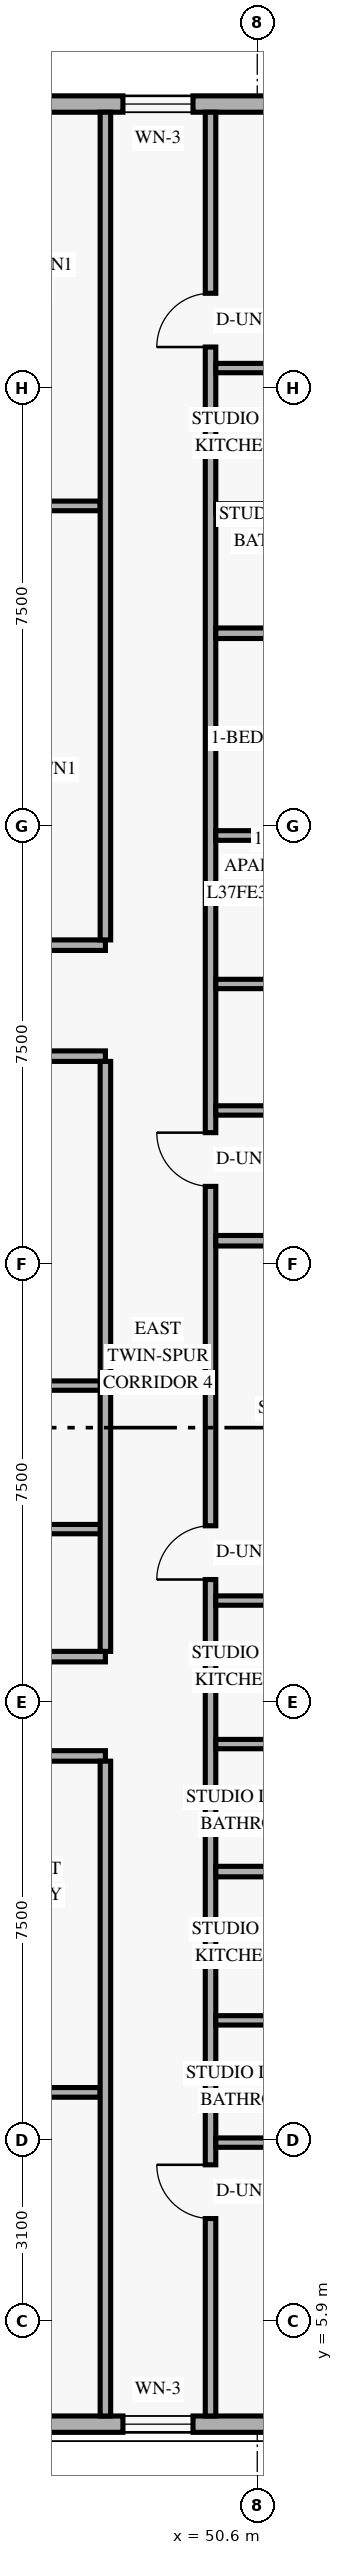
"""IFC4 building model, lengths in metres.
Left out: names, types, materials, properties, quantities, classifications, styles, units other than length and angle.
Written with IfcOpenShell. Run it as: python <this file> out.ifc"""

import sys

from ifc_helpers import new_model, si_unit, direction, frame, frame_2d, origin, place, context, subcontext, project, spatial, rectangle, extrude, element, fill, save


model = new_model("IFC4")
c1 = context("Model", 3, precision=1e-05, world=origin(), true_north=direction((0.0, 1.0)))
c2 = subcontext(c1, "Body", "Model", "MODEL_VIEW")
j1 = project(units=[si_unit("LENGTHUNIT", "METRE"), si_unit("PLANEANGLEUNIT", "RADIAN")], contexts=[c1])
p1 = place(None, origin())
s1 = spatial("IfcSite", under=j1, at=p1, CompositionType="ELEMENT")
p2 = place(p1, origin())
s2 = spatial("IfcBuilding", under=s1, at=p2, CompositionType="ELEMENT")
p3 = place(p2, frame((0.0, 0.0, 144.6)))
s3 = spatial("IfcBuildingStorey", under=s2, at=p3, CompositionType="ELEMENT", Elevation=144.6)
p4 = place(p3, frame((21.22, 4.14, 0.0), z_axis=(0.0, 0.0, 1.0), x_axis=(1.0, 0.0, 0.0)))
e1 = element("IfcWall", 1, at=p4, inside=s3, PredefinedType="SOLIDWALL", context=c2, shape_type="SweptSolid", body=[
    extrude(rectangle(XDim=33.76, YDim=0.28, at=frame_2d((16.88, 0.0))), origin(), (0.0, 0.0, 1.0), 3.36),
])
p5 = place(p4, frame((2.83, 0.0, 0.85)))
e2 = element("IfcOpeningElement", 2, at=p5, cuts=e1, PredefinedType="OPENING", context=c2, shape_type="SweptSolid", body=[
    extrude(rectangle(XDim=1.35, YDim=1.55, at=frame_2d((0.675, 0.775))), frame((0.0, 0.15, 0.0), z_axis=(0.0, -1.0, 0.0), x_axis=(1.0, 0.0, 0.0)), (0.0, 0.0, 1.0), 0.3),
])
p6 = place(p4, frame((9.715, 0.0, 0.85)))
e3 = element("IfcOpeningElement", 3, at=p6, cuts=e1, PredefinedType="OPENING", context=c2, shape_type="SweptSolid", body=[
    extrude(rectangle(XDim=1.35, YDim=1.55, at=frame_2d((0.675, 0.775))), frame((0.0, 0.15, 0.0), z_axis=(0.0, -1.0, 0.0), x_axis=(1.0, 0.0, 0.0)), (0.0, 0.0, 1.0), 0.3),
])
p7 = place(p4, frame((14.99, 0.0, 0.85)))
e4 = element("IfcOpeningElement", 4, at=p7, cuts=e1, PredefinedType="OPENING", context=c2, shape_type="SweptSolid", body=[
    extrude(rectangle(XDim=1.35, YDim=1.55, at=frame_2d((0.675, 0.775))), frame((0.0, 0.15, 0.0), z_axis=(0.0, -1.0, 0.0), x_axis=(1.0, 0.0, 0.0)), (0.0, 0.0, 1.0), 0.3),
])
p8 = place(p4, frame((19.55, 0.0, 0.85)))
e5 = element("IfcOpeningElement", 5, at=p8, cuts=e1, PredefinedType="OPENING", context=c2, shape_type="SweptSolid", body=[
    extrude(rectangle(XDim=1.35, YDim=1.55, at=frame_2d((0.675, 0.775))), frame((0.0, 0.15, 0.0), z_axis=(0.0, -1.0, 0.0), x_axis=(1.0, 0.0, 0.0)), (0.0, 0.0, 1.0), 0.3),
])
p9 = place(p4, frame((24.375, 0.0, 0.85)))
e6 = element("IfcOpeningElement", 6, at=p9, cuts=e1, PredefinedType="OPENING", context=c2, shape_type="SweptSolid", body=[
    extrude(rectangle(XDim=1.35, YDim=1.55, at=frame_2d((0.675, 0.775))), frame((0.0, 0.15, 0.0), z_axis=(0.0, -1.0, 0.0), x_axis=(1.0, 0.0, 0.0)), (0.0, 0.0, 1.0), 0.3),
])
p10 = place(p4, frame((27.08, 0.0, 0.85)))
e7 = element("IfcOpeningElement", 7, at=p10, cuts=e1, PredefinedType="OPENING", context=c2, shape_type="SweptSolid", body=[
    extrude(rectangle(XDim=1.2, YDim=1.5, at=frame_2d((0.6, 0.75))), frame((0.0, 0.15, 0.0), z_axis=(0.0, -1.0, 0.0), x_axis=(1.0, 0.0, 0.0)), (0.0, 0.0, 1.0), 0.3),
])
p11 = place(p4, frame((30.495, 0.0, 0.85)))
e8 = element("IfcOpeningElement", 8, at=p11, cuts=e1, PredefinedType="OPENING", context=c2, shape_type="SweptSolid", body=[
    extrude(rectangle(XDim=1.35, YDim=1.55, at=frame_2d((0.675, 0.775))), frame((0.0, 0.15, 0.0), z_axis=(0.0, -1.0, 0.0), x_axis=(1.0, 0.0, 0.0)), (0.0, 0.0, 1.0), 0.3),
])
p12 = place(p3, frame((54.98, 43.86, 0.0), z_axis=(0.0, 0.0, 1.0), x_axis=(-1.0, 0.0, 0.0)))
e9 = element("IfcWall", 9, at=p12, inside=s3, PredefinedType="SOLIDWALL", context=c2, shape_type="SweptSolid", body=[
    extrude(rectangle(XDim=33.76, YDim=0.28, at=frame_2d((16.88, 0.0))), origin(), (0.0, 0.0, 1.0), 3.36),
])
p13 = place(p12, frame((28.28, 0.0, 0.85)))
e10 = element("IfcOpeningElement", 10, at=p13, cuts=e9, PredefinedType="OPENING", context=c2, shape_type="SweptSolid", body=[
    extrude(rectangle(XDim=1.35, YDim=1.55, at=frame_2d((0.675, 0.775))), frame((0.0, 0.15, 0.0), z_axis=(0.0, -1.0, 0.0), x_axis=(1.0, 0.0, 0.0)), (0.0, 0.0, 1.0), 0.3),
])
p14 = place(p12, frame((21.395, 0.0, 0.85)))
e11 = element("IfcOpeningElement", 11, at=p14, cuts=e9, PredefinedType="OPENING", context=c2, shape_type="SweptSolid", body=[
    extrude(rectangle(XDim=1.35, YDim=1.55, at=frame_2d((0.675, 0.775))), frame((0.0, 0.15, 0.0), z_axis=(0.0, -1.0, 0.0), x_axis=(1.0, 0.0, 0.0)), (0.0, 0.0, 1.0), 0.3),
])
p15 = place(p12, frame((15.09, 0.0, 0.85)))
e12 = element("IfcOpeningElement", 12, at=p15, cuts=e9, PredefinedType="OPENING", context=c2, shape_type="SweptSolid", body=[
    extrude(rectangle(XDim=1.35, YDim=1.55, at=frame_2d((0.675, 0.775))), frame((0.0, 0.15, 0.0), z_axis=(0.0, -1.0, 0.0), x_axis=(1.0, 0.0, 0.0)), (0.0, 0.0, 1.0), 0.3),
])
p16 = place(p12, frame((8.8, 0.0, 0.85)))
e13 = element("IfcOpeningElement", 13, at=p16, cuts=e9, PredefinedType="OPENING", context=c2, shape_type="SweptSolid", body=[
    extrude(rectangle(XDim=1.35, YDim=1.55, at=frame_2d((0.675, 0.775))), frame((0.0, 0.15, 0.0), z_axis=(0.0, -1.0, 0.0), x_axis=(1.0, 0.0, 0.0)), (0.0, 0.0, 1.0), 0.3),
])
p17 = place(p12, frame((5.48, 0.0, 0.85)))
e14 = element("IfcOpeningElement", 14, at=p17, cuts=e9, PredefinedType="OPENING", context=c2, shape_type="SweptSolid", body=[
    extrude(rectangle(XDim=1.2, YDim=1.5, at=frame_2d((0.6, 0.75))), frame((0.0, 0.15, 0.0), z_axis=(0.0, -1.0, 0.0), x_axis=(1.0, 0.0, 0.0)), (0.0, 0.0, 1.0), 0.3),
])
p18 = place(p12, frame((1.915, 0.0, 0.85)))
e15 = element("IfcOpeningElement", 15, at=p18, cuts=e9, PredefinedType="OPENING", context=c2, shape_type="SweptSolid", body=[
    extrude(rectangle(XDim=1.35, YDim=1.55, at=frame_2d((0.675, 0.775))), frame((0.0, 0.15, 0.0), z_axis=(0.0, -1.0, 0.0), x_axis=(1.0, 0.0, 0.0)), (0.0, 0.0, 1.0), 0.3),
])
p19 = place(p3, frame((38.433, 15.58, 0.0), z_axis=(0.0, 0.0, 1.0), x_axis=(1.0, 0.0, 0.0)))
e16 = element("IfcWall", 16, at=p19, inside=s3, PredefinedType="STANDARD", context=c2, shape_type="SweptSolid", body=[
    extrude(rectangle(XDim=9.567, YDim=0.18, at=frame_2d((4.784, 0.0))), origin(), (0.0, 0.0, 1.0), 2.73),
])
p20 = place(p19, frame((0.327, 0.0, 0.0)))
e17 = element("IfcOpeningElement", 17, at=p20, cuts=e16, PredefinedType="OPENING", context=c2, shape_type="SweptSolid", body=[
    extrude(rectangle(XDim=0.92, YDim=2.15, at=frame_2d((0.46, 1.075))), frame((0.0, 0.1, 0.0), z_axis=(0.0, -1.0, 0.0), x_axis=(1.0, 0.0, 0.0)), (0.0, 0.0, 1.0), 0.2),
])
p21 = place(p3, frame((37.64, 17.28, 0.0), z_axis=(0.0, 0.0, 1.0), x_axis=(1.0, 0.0, 0.0)))
e18 = element("IfcWall", 18, at=p21, inside=s3, PredefinedType="STANDARD", context=c2, shape_type="SweptSolid", body=[
    extrude(rectangle(XDim=10.36, YDim=0.18, at=frame_2d((5.18, 0.0))), origin(), (0.0, 0.0, 1.0), 2.73),
])
p22 = place(p21, frame((5.625, 0.0, 0.0)))
e19 = element("IfcOpeningElement", 19, at=p22, cuts=e18, PredefinedType="OPENING", context=c2, shape_type="SweptSolid", body=[
    extrude(rectangle(XDim=0.92, YDim=2.15, at=frame_2d((0.46, 1.075))), frame((0.0, 0.1, 0.0), z_axis=(0.0, -1.0, 0.0), x_axis=(1.0, 0.0, 0.0)), (0.0, 0.0, 1.0), 0.2),
])
p23 = place(p3, frame((37.64, 27.56, 0.0), z_axis=(0.0, 0.0, 1.0), x_axis=(1.0, 0.0, 0.0)))
e20 = element("IfcWall", 20, at=p23, inside=s3, PredefinedType="STANDARD", context=c2, shape_type="SweptSolid", body=[
    extrude(rectangle(XDim=10.36, YDim=0.18, at=frame_2d((5.18, 0.0))), origin(), (0.0, 0.0, 1.0), 2.73),
])
p24 = place(p3, frame((35.51, 29.46, 0.0), z_axis=(0.0, 0.0, 1.0), x_axis=(1.0, 0.0, 0.0)))
e21 = element("IfcWall", 21, at=p24, inside=s3, PredefinedType="STANDARD", context=c2, shape_type="SweptSolid", body=[
    extrude(rectangle(XDim=12.49, YDim=0.18, at=frame_2d((6.245, 0.0))), origin(), (0.0, 0.0, 1.0), 2.73),
])
p25 = place(p24, frame((0.32, 0.0, 0.0)))
e22 = element("IfcOpeningElement", 22, at=p25, cuts=e21, PredefinedType="OPENING", context=c2, shape_type="SweptSolid", body=[
    extrude(rectangle(XDim=0.92, YDim=2.15, at=frame_2d((0.46, 1.075))), frame((0.0, 0.1, 0.0), z_axis=(0.0, -1.0, 0.0), x_axis=(1.0, 0.0, 0.0)), (0.0, 0.0, 1.0), 0.2),
])
p26 = place(p3, frame((44.62, 9.82, 0.0), z_axis=(0.0, 0.0, 1.0), x_axis=(1.0, 0.0, 0.0)))
e23 = element("IfcWall", 23, at=p26, inside=s3, PredefinedType="PARTITIONING", context=c2, shape_type="SweptSolid", body=[
    extrude(rectangle(XDim=3.29, YDim=0.165, at=frame_2d((1.645, 0.0))), origin(), (0.0, 0.0, 1.0), 2.73),
])
p27 = place(p3, frame((43.09, 36.98, 0.0), z_axis=(0.0, 0.0, 1.0), x_axis=(1.0, 0.0, 0.0)))
e24 = element("IfcWall", 24, at=p27, inside=s3, PredefinedType="PARTITIONING", context=c2, shape_type="SweptSolid", body=[
    extrude(rectangle(XDim=4.82, YDim=0.165, at=frame_2d((2.41, 0.0))), origin(), (0.0, 0.0, 1.0), 2.73),
])
p28 = place(p3, frame((45.38, 21.92, 0.0), z_axis=(0.0, 0.0, 1.0), x_axis=(1.0, 0.0, 0.0)))
e25 = element("IfcWall", 25, at=p28, inside=s3, PredefinedType="PLUMBINGWALL", context=c2, shape_type="SweptSolid", body=[
    extrude(rectangle(XDim=2.62, YDim=0.16, at=frame_2d((1.31, 0.0))), origin(), (0.0, 0.0, 1.0), 3.36),
])
p29 = place(p3, frame((45.54, 19.463, 0.0), z_axis=(0.0, 0.0, 1.0), x_axis=(1.0, 0.0, 0.0)))
e26 = element("IfcWall", 26, at=p29, inside=s3, PredefinedType="PLUMBINGWALL", context=c2, shape_type="SweptSolid", body=[
    extrude(rectangle(XDim=2.46, YDim=0.16, at=frame_2d((1.23, 0.0))), origin(), (0.0, 0.0, 1.0), 3.36),
])
p30 = place(p3, frame((49.8, 4.28, 0.0), z_axis=(0.0, 0.0, 1.0), x_axis=(0.0, 1.0, 0.0)))
e27 = element("IfcWall", 27, at=p30, inside=s3, PredefinedType="STANDARD", context=c2, shape_type="SweptSolid", body=[
    extrude(rectangle(XDim=39.44, YDim=0.18, at=frame_2d((19.72, 0.0))), origin(), (0.0, 0.0, 1.0), 2.73),
])
p31 = place(p30, frame((3.38, 0.0, 0.0)))
e28 = element("IfcOpeningElement", 28, at=p31, cuts=e27, PredefinedType="OPENING", context=c2, shape_type="SweptSolid", body=[
    extrude(rectangle(XDim=0.92, YDim=2.15, at=frame_2d((0.46, 1.075))), frame((0.0, 0.1, 0.0), z_axis=(0.0, -1.0, 0.0), x_axis=(1.0, 0.0, 0.0)), (0.0, 0.0, 1.0), 0.2),
])
p32 = place(p30, frame((14.32, 0.0, 0.0)))
e29 = element("IfcOpeningElement", 29, at=p32, cuts=e27, PredefinedType="OPENING", context=c2, shape_type="SweptSolid", body=[
    extrude(rectangle(XDim=0.92, YDim=2.15, at=frame_2d((0.46, 1.075))), frame((0.0, 0.1, 0.0), z_axis=(0.0, -1.0, 0.0), x_axis=(1.0, 0.0, 0.0)), (0.0, 0.0, 1.0), 0.2),
])
p33 = place(p30, frame((21.05, 0.0, 0.0)))
e30 = element("IfcOpeningElement", 30, at=p33, cuts=e27, PredefinedType="OPENING", context=c2, shape_type="SweptSolid", body=[
    extrude(rectangle(XDim=0.92, YDim=2.15, at=frame_2d((0.46, 1.075))), frame((0.0, 0.1, 0.0), z_axis=(0.0, -1.0, 0.0), x_axis=(1.0, 0.0, 0.0)), (0.0, 0.0, 1.0), 0.2),
])
p34 = place(p30, frame((35.42, 0.0, 0.0)))
e31 = element("IfcOpeningElement", 31, at=p34, cuts=e27, PredefinedType="OPENING", context=c2, shape_type="SweptSolid", body=[
    extrude(rectangle(XDim=0.92, YDim=2.15, at=frame_2d((0.46, 1.075))), frame((0.0, 0.1, 0.0), z_axis=(0.0, -1.0, 0.0), x_axis=(1.0, 0.0, 0.0)), (0.0, 0.0, 1.0), 0.2),
])
p35 = place(p3, frame((48.0, 4.28, 0.0), z_axis=(0.0, 0.0, 1.0), x_axis=(0.0, 1.0, 0.0)))
e32 = element("IfcWall", 32, at=p35, inside=s3, PredefinedType="STANDARD", context=c2, shape_type="SweptSolid", body=[
    extrude(rectangle(XDim=11.21, YDim=0.18, at=frame_2d((5.605, 0.0))), origin(), (0.0, 0.0, 1.0), 2.73),
])
p36 = place(p3, frame((48.0, 17.37, 0.0), z_axis=(0.0, 0.0, 1.0), x_axis=(0.0, 1.0, 0.0)))
e33 = element("IfcWall", 33, at=p36, inside=s3, PredefinedType="STANDARD", context=c2, shape_type="SweptSolid", body=[
    extrude(rectangle(XDim=10.1, YDim=0.18, at=frame_2d((5.05, 0.0))), origin(), (0.0, 0.0, 1.0), 2.73),
])
p37 = place(p3, frame((48.0, 29.55, 0.0), z_axis=(0.0, 0.0, 1.0), x_axis=(0.0, 1.0, 0.0)))
e34 = element("IfcWall", 34, at=p37, inside=s3, PredefinedType="STANDARD", context=c2, shape_type="SweptSolid", body=[
    extrude(rectangle(XDim=14.17, YDim=0.18, at=frame_2d((7.085, 0.0))), origin(), (0.0, 0.0, 1.0), 2.73),
])
p38 = place(p3, frame((49.89, 8.96, 0.0), z_axis=(0.0, 0.0, 1.0), x_axis=(1.0, 0.0, 0.0)))
e35 = element("IfcWall", 35, at=p38, inside=s3, PredefinedType="PLUMBINGWALL", context=c2, shape_type="SweptSolid", body=[
    extrude(rectangle(XDim=3.23, YDim=0.16, at=frame_2d((1.615, 0.0))), origin(), (0.0, 0.0, 1.0), 2.879),
])
p39 = place(p3, frame((49.89, 11.053, 0.0), z_axis=(0.0, 0.0, 1.0), x_axis=(1.0, 0.0, 0.0)))
e36 = element("IfcWall", 36, at=p39, inside=s3, PredefinedType="PLUMBINGWALL", context=c2, shape_type="SweptSolid", body=[
    extrude(rectangle(XDim=3.07, YDim=0.16, at=frame_2d((1.535, 0.0))), origin(), (0.0, 0.0, 1.0), 2.879),
])
p40 = place(p3, frame((49.89, 13.6, 0.0), z_axis=(0.0, 0.0, 1.0), x_axis=(1.0, 0.0, 0.0)))
e37 = element("IfcWall", 37, at=p40, inside=s3, PredefinedType="PARTITIONING", context=c2, shape_type="SweptSolid", body=[
    extrude(rectangle(XDim=8.43, YDim=0.18, at=frame_2d((4.215, 0.0))), origin(), (0.0, 0.0, 1.0), 2.879),
])
p41 = place(p3, frame((49.89, 18.24, 0.0), z_axis=(0.0, 0.0, 1.0), x_axis=(1.0, 0.0, 0.0)))
e38 = element("IfcWall", 38, at=p41, inside=s3, PredefinedType="PLUMBINGWALL", context=c2, shape_type="SweptSolid", body=[
    extrude(rectangle(XDim=3.23, YDim=0.16, at=frame_2d((1.615, 0.0))), origin(), (0.0, 0.0, 1.0), 2.879),
])
p42 = place(p3, frame((49.89, 15.783, 0.0), z_axis=(0.0, 0.0, 1.0), x_axis=(1.0, 0.0, 0.0)))
e39 = element("IfcWall", 39, at=p42, inside=s3, PredefinedType="PLUMBINGWALL", context=c2, shape_type="SweptSolid", body=[
    extrude(rectangle(XDim=3.07, YDim=0.16, at=frame_2d((1.535, 0.0))), origin(), (0.0, 0.0, 1.0), 2.879),
])
p43 = place(p3, frame((49.89, 24.4, 0.0), z_axis=(0.0, 0.0, 1.0), x_axis=(1.0, 0.0, 0.0)))
e40 = element("IfcWall", 40, at=p43, inside=s3, PredefinedType="PARTITIONING", context=c2, shape_type="SweptSolid", body=[
    extrude(rectangle(XDim=8.43, YDim=0.18, at=frame_2d((4.215, 0.0))), origin(), (0.0, 0.0, 1.0), 2.879),
])
p44 = place(p3, frame((49.89, 31.337, 0.0), z_axis=(0.0, 0.0, 1.0), x_axis=(1.0, 0.0, 0.0)))
e41 = element("IfcWall", 41, at=p44, inside=s3, PredefinedType="PARTITIONING", context=c2, shape_type="SweptSolid", body=[
    extrude(rectangle(XDim=8.43, YDim=0.165, at=frame_2d((4.215, 0.0))), origin(), (0.0, 0.0, 1.0), 2.879),
])
p45 = place(p44, frame((5.495, 0.0, 0.0)))
e42 = element("IfcOpeningElement", 42, at=p45, cuts=e41, PredefinedType="OPENING", context=c2, shape_type="SweptSolid", body=[
    extrude(rectangle(XDim=0.9, YDim=2.14, at=frame_2d((0.45, 1.07))), frame((0.0, 0.093, 0.0), z_axis=(0.0, -1.0, 0.0), x_axis=(1.0, 0.0, 0.0)), (0.0, 0.0, 1.0), 0.185),
])
p46 = place(p3, frame((49.89, 26.63, 0.0), z_axis=(0.0, 0.0, 1.0), x_axis=(1.0, 0.0, 0.0)))
e43 = element("IfcWall", 43, at=p46, inside=s3, PredefinedType="PLUMBINGWALL", context=c2, shape_type="SweptSolid", body=[
    extrude(rectangle(XDim=3.23, YDim=0.16, at=frame_2d((1.615, 0.0))), origin(), (0.0, 0.0, 1.0), 2.879),
])
p47 = place(p3, frame((49.89, 28.796, 0.0), z_axis=(0.0, 0.0, 1.0), x_axis=(1.0, 0.0, 0.0)))
e44 = element("IfcWall", 44, at=p47, inside=s3, PredefinedType="PLUMBINGWALL", context=c2, shape_type="SweptSolid", body=[
    extrude(rectangle(XDim=3.07, YDim=0.16, at=frame_2d((1.535, 0.0))), origin(), (0.0, 0.0, 1.0), 2.879),
])
p48 = place(p3, frame((49.89, 34.8, 0.0), z_axis=(0.0, 0.0, 1.0), x_axis=(1.0, 0.0, 0.0)))
e45 = element("IfcWall", 45, at=p48, inside=s3, PredefinedType="PARTITIONING", context=c2, shape_type="SweptSolid", body=[
    extrude(rectangle(XDim=8.43, YDim=0.18, at=frame_2d((4.215, 0.0))), origin(), (0.0, 0.0, 1.0), 2.879),
])
p49 = place(p3, frame((49.89, 39.34, 0.0), z_axis=(0.0, 0.0, 1.0), x_axis=(1.0, 0.0, 0.0)))
e46 = element("IfcWall", 46, at=p49, inside=s3, PredefinedType="PLUMBINGWALL", context=c2, shape_type="SweptSolid", body=[
    extrude(rectangle(XDim=3.23, YDim=0.16, at=frame_2d((1.615, 0.0))), origin(), (0.0, 0.0, 1.0), 2.879),
])
p50 = place(p3, frame((49.89, 36.937, 0.0), z_axis=(0.0, 0.0, 1.0), x_axis=(1.0, 0.0, 0.0)))
e47 = element("IfcWall", 47, at=p50, inside=s3, PredefinedType="PLUMBINGWALL", context=c2, shape_type="SweptSolid", body=[
    extrude(rectangle(XDim=3.07, YDim=0.16, at=frame_2d((1.535, 0.0))), origin(), (0.0, 0.0, 1.0), 2.879),
])
p51 = place(p10, origin())
e48 = element("IfcWindow", 48, at=p51, inside=s3, PartitioningType="SINGLE_PANEL", PredefinedType="WINDOW", context=c2, shape_type="SweptSolid", body=[
    extrude(rectangle(XDim=1.2, YDim=1.5, at=frame_2d((0.6, 0.75))), frame((0.0, 0.03, 0.0), z_axis=(0.0, -1.0, 0.0), x_axis=(1.0, 0.0, 0.0)), (0.0, 0.0, 1.0), 0.06),
])
fill(e7, e48)
p52 = place(p17, origin())
e49 = element("IfcWindow", 49, at=p52, inside=s3, PartitioningType="SINGLE_PANEL", PredefinedType="WINDOW", context=c2, shape_type="SweptSolid", body=[
    extrude(rectangle(XDim=1.2, YDim=1.5, at=frame_2d((0.6, 0.75))), frame((0.0, 0.03, 0.0), z_axis=(0.0, -1.0, 0.0), x_axis=(1.0, 0.0, 0.0)), (0.0, 0.0, 1.0), 0.06),
])
fill(e14, e49)
p53 = place(p31, origin())
e50 = element("IfcDoor", 50, at=p53, inside=s3, OperationType="SINGLE_SWING_RIGHT", PredefinedType="DOOR", context=c2, shape_type="SweptSolid", body=[
    extrude(rectangle(XDim=0.92, YDim=2.15, at=frame_2d((0.46, 1.075))), frame((0.0, 0.025, 0.0), z_axis=(0.0, -1.0, 0.0), x_axis=(1.0, 0.0, 0.0)), (0.0, 0.0, 1.0), 0.05),
])
fill(e28, e50)
p54 = place(p32, origin())
e51 = element("IfcDoor", 51, at=p54, inside=s3, OperationType="SINGLE_SWING_LEFT", PredefinedType="DOOR", context=c2, shape_type="SweptSolid", body=[
    extrude(rectangle(XDim=0.92, YDim=2.15, at=frame_2d((0.46, 1.075))), frame((0.0, 0.025, 0.0), z_axis=(0.0, -1.0, 0.0), x_axis=(1.0, 0.0, 0.0)), (0.0, 0.0, 1.0), 0.05),
])
fill(e29, e51)
p55 = place(p33, origin())
e52 = element("IfcDoor", 52, at=p55, inside=s3, OperationType="SINGLE_SWING_RIGHT", PredefinedType="DOOR", context=c2, shape_type="SweptSolid", body=[
    extrude(rectangle(XDim=0.92, YDim=2.15, at=frame_2d((0.46, 1.075))), frame((0.0, 0.025, 0.0), z_axis=(0.0, -1.0, 0.0), x_axis=(1.0, 0.0, 0.0)), (0.0, 0.0, 1.0), 0.05),
])
fill(e30, e52)
p56 = place(p34, origin())
e53 = element("IfcDoor", 53, at=p56, inside=s3, OperationType="SINGLE_SWING_LEFT", PredefinedType="DOOR", context=c2, shape_type="SweptSolid", body=[
    extrude(rectangle(XDim=0.92, YDim=2.15, at=frame_2d((0.46, 1.075))), frame((0.0, 0.025, 0.0), z_axis=(0.0, -1.0, 0.0), x_axis=(1.0, 0.0, 0.0)), (0.0, 0.0, 1.0), 0.05),
])
fill(e31, e53)
save(model, sys.argv[1])
